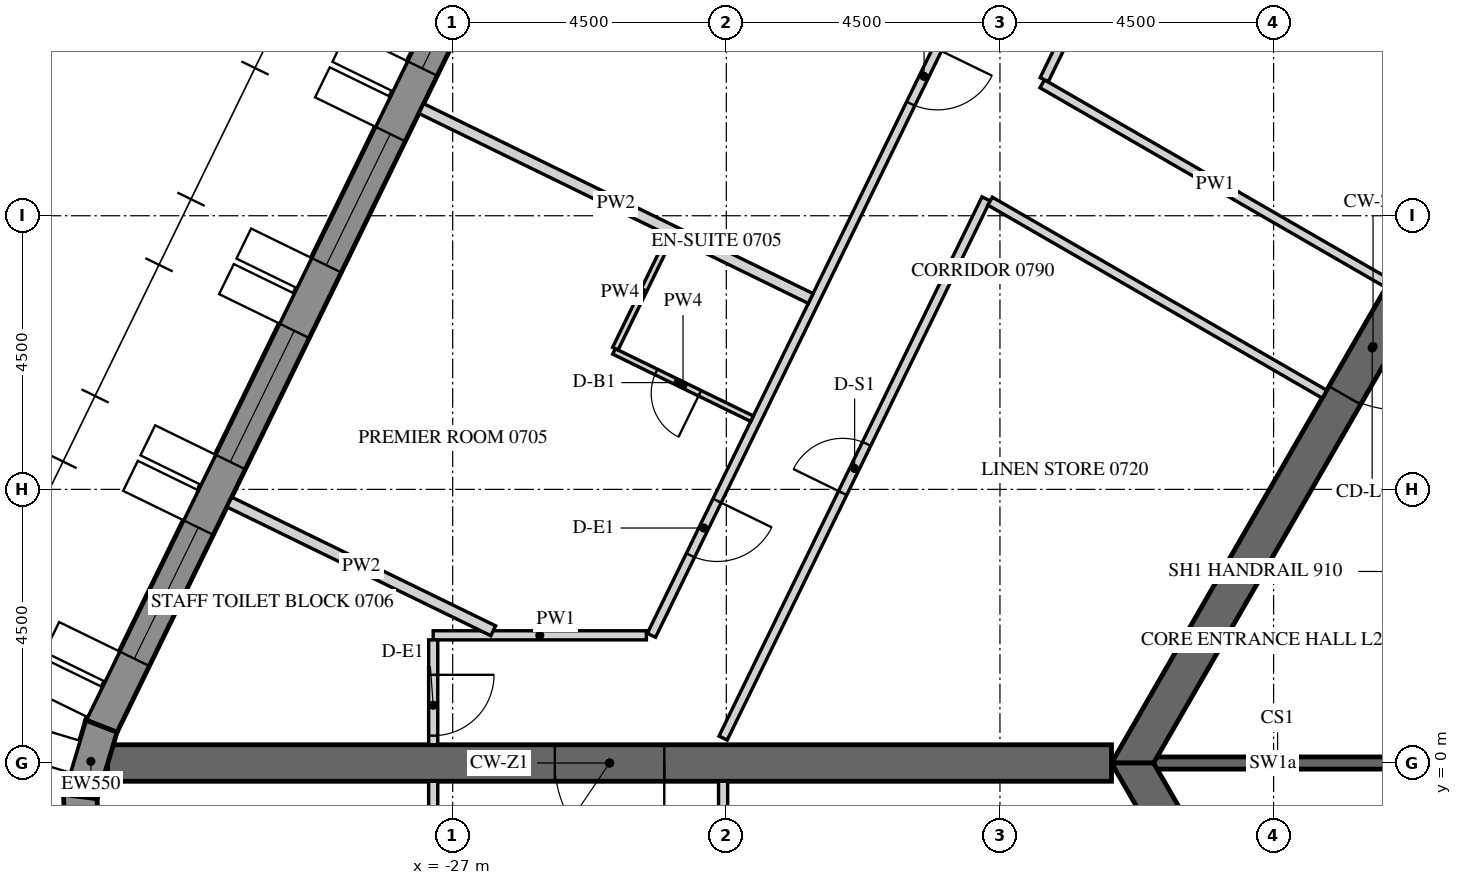
"""IFC4 building model, lengths in metres.
Left out: names, types, materials, properties, quantities, classifications, styles, units other than length and angle.
Written with IfcOpenShell. Run it as: python <this file> out.ifc"""

import sys

from ifc_helpers import new_model, si_unit, direction, frame, frame_2d, origin, place, context, subcontext, project, spatial, polyline, rectangle, outline, extrude, element, fill, save


model = new_model("IFC4")
c1 = context("Model", 3, precision=1e-05, world=origin(), true_north=direction((0.0, 1.0)))
c2 = subcontext(c1, "Body", "Model", "MODEL_VIEW")
j1 = project(units=[si_unit("LENGTHUNIT", "METRE"), si_unit("PLANEANGLEUNIT", "RADIAN")], contexts=[c1])
p1 = place(None, origin())
s1 = spatial("IfcSite", under=j1, at=p1, CompositionType="ELEMENT")
p2 = place(p1, origin())
s2 = spatial("IfcBuilding", under=s1, at=p2, CompositionType="ELEMENT")
p3 = place(p2, frame((0.0, 0.0, 99.9)))
s3 = spatial("IfcBuildingStorey", under=s2, at=p3, CompositionType="ELEMENT", Elevation=99.9)
p4 = place(p3, frame((-19.595, 27.633, -0.15), z_axis=(0.0, 0.0, 1.0), x_axis=(-0.438368285794, -0.898795441694, 0.0)))
e1 = element("IfcWall", 1, at=p4, inside=s3, PredefinedType="SOLIDWALL", context=c2, shape_type="SweptSolid", body=[
    extrude(outline(polyline([(-0.026, -0.275), (30.093, -0.275), (30.048, 0.275), (0.026, 0.275), (-0.026, -0.275)])), origin(), (0.0, 0.0, 1.0), 3.9),
])
p5 = place(p4, frame((1.236, 0.0, 1.05)))
e2 = element("IfcOpeningElement", 2, at=p5, cuts=e1, PredefinedType="OPENING", context=c2, shape_type="SweptSolid", body=[
    extrude(rectangle(XDim=2.4, YDim=2.4, at=frame_2d((1.2, 1.2))), frame((0.0, 0.285, 0.0), z_axis=(0.0, -1.0, 0.0), x_axis=(1.0, 0.0, 0.0)), (0.0, 0.0, 1.0), 0.57),
])
p6 = place(p4, frame((4.835, 0.0, 1.05)))
e3 = element("IfcOpeningElement", 3, at=p6, cuts=e1, PredefinedType="OPENING", context=c2, shape_type="SweptSolid", body=[
    extrude(rectangle(XDim=2.4, YDim=2.4, at=frame_2d((1.2, 1.2))), frame((0.0, 0.285, 0.0), z_axis=(0.0, -1.0, 0.0), x_axis=(1.0, 0.0, 0.0)), (0.0, 0.0, 1.0), 0.57),
])
p7 = place(p4, frame((8.436, 0.0, 1.05)))
e4 = element("IfcOpeningElement", 4, at=p7, cuts=e1, PredefinedType="OPENING", context=c2, shape_type="SweptSolid", body=[
    extrude(rectangle(XDim=2.4, YDim=2.4, at=frame_2d((1.2, 1.2))), frame((0.0, 0.285, 0.0), z_axis=(0.0, -1.0, 0.0), x_axis=(1.0, 0.0, 0.0)), (0.0, 0.0, 1.0), 0.57),
])
p8 = place(p4, frame((12.035, 0.0, 1.05)))
e5 = element("IfcOpeningElement", 5, at=p8, cuts=e1, PredefinedType="OPENING", context=c2, shape_type="SweptSolid", body=[
    extrude(rectangle(XDim=2.4, YDim=2.4, at=frame_2d((1.2, 1.2))), frame((0.0, 0.285, 0.0), z_axis=(0.0, -1.0, 0.0), x_axis=(1.0, 0.0, 0.0)), (0.0, 0.0, 1.0), 0.57),
])
p9 = place(p4, frame((15.635, 0.0, 1.05)))
e6 = element("IfcOpeningElement", 6, at=p9, cuts=e1, PredefinedType="OPENING", context=c2, shape_type="SweptSolid", body=[
    extrude(rectangle(XDim=2.4, YDim=2.4, at=frame_2d((1.2, 1.2))), frame((0.0, 0.285, 0.0), z_axis=(0.0, -1.0, 0.0), x_axis=(1.0, 0.0, 0.0)), (0.0, 0.0, 1.0), 0.57),
])
p10 = place(p4, frame((19.236, 0.0, 1.05)))
e7 = element("IfcOpeningElement", 7, at=p10, cuts=e1, PredefinedType="OPENING", context=c2, shape_type="SweptSolid", body=[
    extrude(rectangle(XDim=2.4, YDim=2.4, at=frame_2d((1.2, 1.2))), frame((0.0, 0.285, 0.0), z_axis=(0.0, -1.0, 0.0), x_axis=(1.0, 0.0, 0.0)), (0.0, 0.0, 1.0), 0.57),
])
p11 = place(p4, frame((22.835, 0.0, 1.05)))
e8 = element("IfcOpeningElement", 8, at=p11, cuts=e1, PredefinedType="OPENING", context=c2, shape_type="SweptSolid", body=[
    extrude(rectangle(XDim=2.4, YDim=2.4, at=frame_2d((1.2, 1.2))), frame((0.0, 0.285, 0.0), z_axis=(0.0, -1.0, 0.0), x_axis=(1.0, 0.0, 0.0)), (0.0, 0.0, 1.0), 0.57),
])
p12 = place(p4, frame((26.436, 0.0, 1.05)))
e9 = element("IfcOpeningElement", 9, at=p12, cuts=e1, PredefinedType="OPENING", context=c2, shape_type="SweptSolid", body=[
    extrude(rectangle(XDim=2.4, YDim=2.4, at=frame_2d((1.2, 1.2))), frame((0.0, 0.285, 0.0), z_axis=(0.0, -1.0, 0.0), x_axis=(1.0, 0.0, 0.0)), (0.0, 0.0, 1.0), 0.57),
])
p13 = place(p3, frame((-32.777, 0.605, -0.15), z_axis=(0.0, 0.0, 1.0), x_axis=(-0.286921497463, -0.957954098219, 0.0)))
e10 = element("IfcWall", 10, at=p13, inside=s3, PredefinedType="SOLIDWALL", context=c2, shape_type="SweptSolid", body=[
    extrude(outline(polyline([(-0.022, -0.275), (1.253, -0.275), (1.163, 0.275), (0.022, 0.275), (-0.022, -0.275)])), origin(), (0.0, 0.0, 1.0), 3.9),
])
p14 = place(p3, frame((-33.124, -0.552, -0.15), z_axis=(0.0, 0.0, 1.0), x_axis=(0.03495638276, -0.999388838893, 0.0)))
e11 = element("IfcWall", 11, at=p14, inside=s3, PredefinedType="SOLIDWALL", context=c2, shape_type="SweptSolid", body=[
    extrude(outline(polyline([(-0.045, -0.275), (1.253, -0.275), (1.163, 0.275), (0.045, 0.275), (-0.045, -0.275)])), origin(), (0.0, 0.0, 1.0), 3.9),
])
p15 = place(p3, frame((-7.91, 13.7, -0.15), z_axis=(0.0, 0.0, 1.0), x_axis=(-0.499999880136, -0.866025472988, 0.0)))
e12 = element("IfcWall", 12, at=p15, inside=s3, PredefinedType="SHEAR", context=c2, shape_type="SweptSolid", body=[
    extrude(outline(polyline([(-0.173, -0.3), (15.993, -0.3), (15.646, 0.3), (0.173, 0.3), (-0.173, -0.3)])), origin(), (0.0, 0.0, 1.0), 3.9),
])
p16 = place(p15, frame((7.039, 0.0, 0.15)))
e13 = element("IfcOpeningElement", 13, at=p16, cuts=e12, PredefinedType="OPENING", context=c2, shape_type="SweptSolid", body=[
    extrude(rectangle(XDim=1.8, YDim=2.4, at=frame_2d((0.9, 1.2))), frame((0.0, 0.31, 0.0), z_axis=(0.0, -1.0, 0.0), x_axis=(1.0, 0.0, 0.0)), (0.0, 0.0, 1.0), 0.62),
])
p17 = place(p3, frame((-15.819, 0.0, -0.15), z_axis=(0.0, 0.0, 1.0), x_axis=(0.499999880136, -0.866025472988, 0.0)))
e14 = element("IfcWall", 14, at=p17, inside=s3, PredefinedType="SHEAR", context=c2, shape_type="SweptSolid", body=[
    extrude(outline(polyline([(-0.173, -0.3), (15.993, -0.3), (15.646, 0.3), (0.173, 0.3), (-0.173, -0.3)])), origin(), (0.0, 0.0, 1.0), 3.9),
])
p18 = place(p17, frame((6.981, 0.0, 0.15)))
e15 = element("IfcOpeningElement", 15, at=p18, cuts=e14, PredefinedType="OPENING", context=c2, shape_type="SweptSolid", body=[
    extrude(rectangle(XDim=1.8, YDim=2.4, at=frame_2d((0.9, 1.2))), frame((0.0, 0.31, 0.0), z_axis=(0.0, -1.0, 0.0), x_axis=(1.0, 0.0, 0.0)), (0.0, 0.0, 1.0), 0.62),
])
p19 = place(p3, frame((-16.166, 0.0, -0.15), z_axis=(0.0, 0.0, 1.0), x_axis=(-1.0, 0.0, 0.0)))
e16 = element("IfcWall", 16, at=p19, inside=s3, PredefinedType="SHEAR", context=c2, shape_type="SweptSolid", body=[
    extrude(rectangle(XDim=16.509, YDim=0.6, at=frame_2d((8.254, 0.0))), origin(), (0.0, 0.0, 1.0), 3.9),
])
p20 = place(p19, frame((7.354, 0.0, 0.15)))
e17 = element("IfcOpeningElement", 17, at=p20, cuts=e16, PredefinedType="OPENING", context=c2, shape_type="SweptSolid", body=[
    extrude(rectangle(XDim=1.8, YDim=2.4, at=frame_2d((0.9, 1.2))), frame((0.0, 0.31, 0.0), z_axis=(0.0, -1.0, 0.0), x_axis=(1.0, 0.0, 0.0)), (0.0, 0.0, 1.0), 0.62),
])
p21 = place(p3, frame((-11.547, 0.0, -0.15), z_axis=(0.0, 0.0, 1.0), x_axis=(-1.0, 0.0, 0.0)))
e18 = element("IfcWall", 18, at=p21, inside=s3, PredefinedType="SHEAR", context=c2, shape_type="SweptSolid", body=[
    extrude(rectangle(XDim=3.926, YDim=0.2, at=frame_2d((1.963, 0.0))), origin(), (0.0, 0.0, 1.0), 3.9),
])
p22 = place(p3, frame((-13.94, 22.175, 0.0), z_axis=(0.0, 0.0, 1.0), x_axis=(-0.438373022655, -0.898793131376, 0.0)))
e19 = element("IfcWall", 19, at=p22, inside=s3, PredefinedType="PARTITIONING", context=c2, shape_type="SweptSolid", body=[
    extrude(rectangle(XDim=22.335, YDim=0.15, at=frame_2d((11.168, 0.0))), origin(), (0.0, 0.0, 1.0), 2.988),
])
p23 = place(p22, frame((3.363, 0.0, 0.0)))
e20 = element("IfcOpeningElement", 20, at=p23, cuts=e19, PredefinedType="OPENING", context=c2, shape_type="SweptSolid", body=[
    extrude(rectangle(XDim=1.0, YDim=2.1, at=frame_2d((0.5, 1.05))), frame((0.0, 0.085, 0.0), z_axis=(0.0, -1.0, 0.0), x_axis=(1.0, 0.0, 0.0)), (0.0, 0.0, 1.0), 0.17),
])
p24 = place(p22, frame((11.609, 0.0, 0.0)))
e21 = element("IfcOpeningElement", 21, at=p24, cuts=e19, PredefinedType="OPENING", context=c2, shape_type="SweptSolid", body=[
    extrude(rectangle(XDim=1.0, YDim=2.1, at=frame_2d((0.5, 1.05))), frame((0.0, 0.085, 0.0), z_axis=(0.0, -1.0, 0.0), x_axis=(1.0, 0.0, 0.0)), (0.0, 0.0, 1.0), 0.17),
])
p25 = place(p22, frame((19.872, 0.0, 0.0)))
e22 = element("IfcOpeningElement", 22, at=p25, cuts=e19, PredefinedType="OPENING", context=c2, shape_type="SweptSolid", body=[
    extrude(rectangle(XDim=1.0, YDim=2.1, at=frame_2d((0.5, 1.05))), frame((0.0, 0.085, 0.0), z_axis=(0.0, -1.0, 0.0), x_axis=(1.0, 0.0, 0.0)), (0.0, 0.0, 1.0), 0.17),
])
p26 = place(p3, frame((-23.815, 2.1, 0.0), z_axis=(0.0, 0.0, 1.0), x_axis=(-1.0, 0.0, 0.0)))
e23 = element("IfcWall", 23, at=p26, inside=s3, PredefinedType="PARTITIONING", context=c2, shape_type="SweptSolid", body=[
    extrude(rectangle(XDim=3.506, YDim=0.15, at=frame_2d((1.753, 0.0))), origin(), (0.0, 0.0, 1.0), 2.988),
])
p27 = place(p3, frame((-27.32, 2.025, 0.0), z_axis=(0.0, 0.0, 1.0), x_axis=(0.0, -1.0, 0.0)))
e24 = element("IfcWall", 24, at=p27, inside=s3, PredefinedType="PARTITIONING", context=c2, shape_type="SweptSolid", body=[
    extrude(rectangle(XDim=1.725, YDim=0.15, at=frame_2d((0.862, 0.0))), origin(), (0.0, 0.0, 1.0), 2.988),
])
p28 = place(p27, frame((0.575, 0.0, 0.0)))
e25 = element("IfcOpeningElement", 25, at=p28, cuts=e24, PredefinedType="OPENING", context=c2, shape_type="SweptSolid", body=[
    extrude(rectangle(XDim=1.0, YDim=2.1, at=frame_2d((0.5, 1.05))), frame((0.0, 0.085, 0.0), z_axis=(0.0, -1.0, 0.0), x_axis=(1.0, 0.0, 0.0)), (0.0, 0.0, 1.0), 0.17),
])
p29 = place(p3, frame((-11.614, 7.884, 0.0), z_axis=(0.0, 0.0, 1.0), x_axis=(-0.866025963225, 0.49999903102, 0.0)))
e26 = element("IfcWall", 26, at=p29, inside=s3, PredefinedType="PARTITIONING", context=c2, shape_type="SweptSolid", body=[
    extrude(rectangle(XDim=6.571, YDim=0.15, at=frame_2d((3.286, 0.0))), origin(), (0.0, 0.0, 1.0), 2.988),
])
p30 = place(p3, frame((-17.272, 11.238, 0.0), z_axis=(0.0, 0.0, 1.0), x_axis=(0.438369193793, 0.898794998836, 0.0)))
e27 = element("IfcWall", 27, at=p30, inside=s3, PredefinedType="PARTITIONING", context=c2, shape_type="SweptSolid", body=[
    extrude(rectangle(XDim=10.25, YDim=0.15, at=frame_2d((5.125, 0.0))), origin(), (0.0, 0.0, 1.0), 2.988),
])
p31 = place(p3, frame((-22.553, 0.41, 0.0), z_axis=(0.0, 0.0, 1.0), x_axis=(0.438382679221, 0.898788421465, 0.0)))
e28 = element("IfcWall", 28, at=p31, inside=s3, PredefinedType="PARTITIONING", context=c2, shape_type="SweptSolid", body=[
    extrude(rectangle(XDim=9.866, YDim=0.15, at=frame_2d((4.933, 0.0))), origin(), (0.0, 0.0, 1.0), 2.988),
])
p32 = place(p31, frame((4.483, 0.0, 0.0)))
e29 = element("IfcOpeningElement", 29, at=p32, cuts=e28, PredefinedType="OPENING", context=c2, shape_type="SweptSolid", body=[
    extrude(rectangle(XDim=0.9, YDim=2.1, at=frame_2d((0.45, 1.05))), frame((0.0, 0.085, 0.0), z_axis=(0.0, -1.0, 0.0), x_axis=(1.0, 0.0, 0.0)), (0.0, 0.0, 1.0), 0.17),
])
p33 = place(p3, frame((-18.162, 9.24, 0.0), z_axis=(0.0, 0.0, 1.0), x_axis=(0.866026781814, -0.499997613175, 0.0)))
e30 = element("IfcWall", 30, at=p33, inside=s3, PredefinedType="PARTITIONING", context=c2, shape_type="SweptSolid", body=[
    extrude(rectangle(XDim=6.349, YDim=0.15, at=frame_2d((3.175, 0.0))), origin(), (0.0, 0.0, 1.0), 2.988),
])
p34 = place(p3, frame((-27.32, -0.3, 0.0), z_axis=(0.0, 0.0, 1.0), x_axis=(0.0, -1.0, 0.0)))
e31 = element("IfcWall", 31, at=p34, inside=s3, PredefinedType="PARTITIONING", context=c2, shape_type="SweptSolid", body=[
    extrude(rectangle(XDim=1.8, YDim=0.15, at=frame_2d((0.9, 0.0))), origin(), (0.0, 0.0, 1.0), 2.988),
])
p35 = place(p3, frame((-22.553, -1.688, 0.0), z_axis=(0.0, 0.0, 1.0), x_axis=(0.0, 1.0, 0.0)))
e32 = element("IfcWall", 32, at=p35, inside=s3, PredefinedType="PARTITIONING", context=c2, shape_type="SweptSolid", body=[
    extrude(rectangle(XDim=1.387, YDim=0.15, at=frame_2d((0.694, 0.0))), origin(), (0.0, 0.0, 1.0), 2.988),
])
p36 = place(p3, frame((-27.517, 10.763, 0.0), z_axis=(0.0, 0.0, 1.0), x_axis=(0.898783593711, -0.438392577123, 0.0)))
e33 = element("IfcWall", 33, at=p36, inside=s3, PredefinedType="PARTITIONING", context=c2, shape_type="SweptSolid", body=[
    extrude(rectangle(XDim=7.125, YDim=0.18, at=frame_2d((3.562, 0.0))), origin(), (0.0, 0.0, 1.0), 2.988),
])
p37 = place(p3, frame((-22.077, 5.662, 0.0), z_axis=(0.0, 0.0, 1.0), x_axis=(-0.898792604152, 0.438374103617, 0.0)))
e34 = element("IfcWall", 34, at=p37, inside=s3, PredefinedType="PARTITIONING", context=c2, shape_type="SweptSolid", body=[
    extrude(rectangle(XDim=2.525, YDim=0.1, at=frame_2d((1.263, 0.0))), origin(), (0.0, 0.0, 1.0), 2.988),
])
p38 = place(p37, frame((0.955, 0.0, 0.0)))
e35 = element("IfcOpeningElement", 35, at=p38, cuts=e34, PredefinedType="OPENING", context=c2, shape_type="SweptSolid", body=[
    extrude(rectangle(XDim=0.8, YDim=2.1, at=frame_2d((0.4, 1.05))), frame((0.0, 0.06, 0.0), z_axis=(0.0, -1.0, 0.0), x_axis=(1.0, 0.0, 0.0)), (0.0, 0.0, 1.0), 0.12),
])
p39 = place(p3, frame((-24.325, 6.814, 0.0), z_axis=(0.0, 0.0, 1.0), x_axis=(0.438374597956, 0.898792363044, 0.0)))
e36 = element("IfcWall", 36, at=p39, inside=s3, PredefinedType="PARTITIONING", context=c2, shape_type="SweptSolid", body=[
    extrude(rectangle(XDim=2.06, YDim=0.1, at=frame_2d((1.03, 0.0))), origin(), (0.0, 0.0, 1.0), 2.988),
])
p40 = place(p3, frame((-30.673, 4.292, 0.0), z_axis=(0.0, 0.0, 1.0), x_axis=(0.898812662672, -0.438332975512, 0.0)))
e37 = element("IfcWall", 37, at=p40, inside=s3, PredefinedType="PARTITIONING", context=c2, shape_type="SweptSolid", body=[
    extrude(rectangle(XDim=4.828, YDim=0.18, at=frame_2d((2.414, 0.0))), origin(), (0.0, 0.0, 1.0), 2.988),
])
p41 = place(p9, frame((0.0, 0.205, 0.0)))
e38 = element("IfcWindow", 38, at=p41, inside=s3, PartitioningType="DOUBLE_PANEL_VERTICAL", PredefinedType="WINDOW", context=c2, shape_type="SweptSolid", body=[
    extrude(rectangle(XDim=2.4, YDim=2.4, at=frame_2d((1.2, 1.2))), frame((0.0, 0.03, 0.0), z_axis=(0.0, -1.0, 0.0), x_axis=(1.0, 0.0, 0.0)), (0.0, 0.0, 1.0), 0.06),
])
fill(e6, e38)
p42 = place(p10, frame((0.0, 0.205, 0.0)))
e39 = element("IfcWindow", 39, at=p42, inside=s3, PartitioningType="DOUBLE_PANEL_VERTICAL", PredefinedType="WINDOW", context=c2, shape_type="SweptSolid", body=[
    extrude(rectangle(XDim=2.4, YDim=2.4, at=frame_2d((1.2, 1.2))), frame((0.0, 0.03, 0.0), z_axis=(0.0, -1.0, 0.0), x_axis=(1.0, 0.0, 0.0)), (0.0, 0.0, 1.0), 0.06),
])
fill(e7, e39)
p43 = place(p11, frame((0.0, 0.205, 0.0)))
e40 = element("IfcWindow", 40, at=p43, inside=s3, PartitioningType="DOUBLE_PANEL_VERTICAL", PredefinedType="WINDOW", context=c2, shape_type="SweptSolid", body=[
    extrude(rectangle(XDim=2.4, YDim=2.4, at=frame_2d((1.2, 1.2))), frame((0.0, 0.03, 0.0), z_axis=(0.0, -1.0, 0.0), x_axis=(1.0, 0.0, 0.0)), (0.0, 0.0, 1.0), 0.06),
])
fill(e8, e40)
p44 = place(p12, frame((0.0, 0.205, 0.0)))
e41 = element("IfcWindow", 41, at=p44, inside=s3, PartitioningType="DOUBLE_PANEL_VERTICAL", PredefinedType="WINDOW", context=c2, shape_type="SweptSolid", body=[
    extrude(rectangle(XDim=2.4, YDim=2.4, at=frame_2d((1.2, 1.2))), frame((0.0, 0.03, 0.0), z_axis=(0.0, -1.0, 0.0), x_axis=(1.0, 0.0, 0.0)), (0.0, 0.0, 1.0), 0.06),
])
fill(e9, e41)
p45 = place(p16, origin())
e42 = element("IfcDoor", 42, at=p45, inside=s3, OperationType="DOUBLE_DOOR_SINGLE_SWING", PredefinedType="DOOR", context=c2, shape_type="SweptSolid", body=[
    extrude(rectangle(XDim=1.8, YDim=2.4, at=frame_2d((0.9, 1.2))), frame((0.0, 0.025, 0.0), z_axis=(0.0, -1.0, 0.0), x_axis=(1.0, 0.0, 0.0)), (0.0, 0.0, 1.0), 0.05),
])
fill(e13, e42)
p46 = place(p20, origin())
e43 = element("IfcDoor", 43, at=p46, inside=s3, OperationType="DOUBLE_DOOR_SINGLE_SWING", PredefinedType="DOOR", context=c2, shape_type="SweptSolid", body=[
    extrude(rectangle(XDim=1.8, YDim=2.4, at=frame_2d((0.9, 1.2))), frame((0.0, 0.025, 0.0), z_axis=(0.0, -1.0, 0.0), x_axis=(1.0, 0.0, 0.0)), (0.0, 0.0, 1.0), 0.05),
])
fill(e17, e43)
p47 = place(p24, origin())
e44 = element("IfcDoor", 44, at=p47, inside=s3, OperationType="SINGLE_SWING_LEFT", PredefinedType="DOOR", context=c2, shape_type="SweptSolid", body=[
    extrude(rectangle(XDim=1.0, YDim=2.1, at=frame_2d((0.5, 1.05))), frame((0.0, 0.025, 0.0), z_axis=(0.0, -1.0, 0.0), x_axis=(1.0, 0.0, 0.0)), (0.0, 0.0, 1.0), 0.05),
])
fill(e21, e44)
p48 = place(p25, origin())
e45 = element("IfcDoor", 45, at=p48, inside=s3, OperationType="SINGLE_SWING_RIGHT", PredefinedType="DOOR", context=c2, shape_type="SweptSolid", body=[
    extrude(rectangle(XDim=1.0, YDim=2.1, at=frame_2d((0.5, 1.05))), frame((0.0, 0.025, 0.0), z_axis=(0.0, -1.0, 0.0), x_axis=(1.0, 0.0, 0.0)), (0.0, 0.0, 1.0), 0.05),
])
fill(e22, e45)
p49 = place(p38, origin())
e46 = element("IfcDoor", 46, at=p49, inside=s3, OperationType="SINGLE_SWING_LEFT", PredefinedType="DOOR", context=c2, shape_type="SweptSolid", body=[
    extrude(rectangle(XDim=0.8, YDim=2.1, at=frame_2d((0.4, 1.05))), frame((0.0, 0.025, 0.0), z_axis=(0.0, -1.0, 0.0), x_axis=(1.0, 0.0, 0.0)), (0.0, 0.0, 1.0), 0.05),
])
fill(e35, e46)
p50 = place(p28, origin())
e47 = element("IfcDoor", 47, at=p50, inside=s3, OperationType="SINGLE_SWING_LEFT", PredefinedType="DOOR", context=c2, shape_type="SweptSolid", body=[
    extrude(rectangle(XDim=1.0, YDim=2.1, at=frame_2d((0.5, 1.05))), frame((0.0, 0.025, 0.0), z_axis=(0.0, -1.0, 0.0), x_axis=(1.0, 0.0, 0.0)), (0.0, 0.0, 1.0), 0.05),
])
fill(e25, e47)
p51 = place(p32, origin())
e48 = element("IfcDoor", 48, at=p51, inside=s3, OperationType="SINGLE_SWING_RIGHT", PredefinedType="DOOR", context=c2, shape_type="SweptSolid", body=[
    extrude(rectangle(XDim=0.9, YDim=2.1, at=frame_2d((0.45, 1.05))), frame((0.0, 0.025, 0.0), z_axis=(0.0, -1.0, 0.0), x_axis=(1.0, 0.0, 0.0)), (0.0, 0.0, 1.0), 0.05),
])
fill(e29, e48)
save(model, sys.argv[1])
